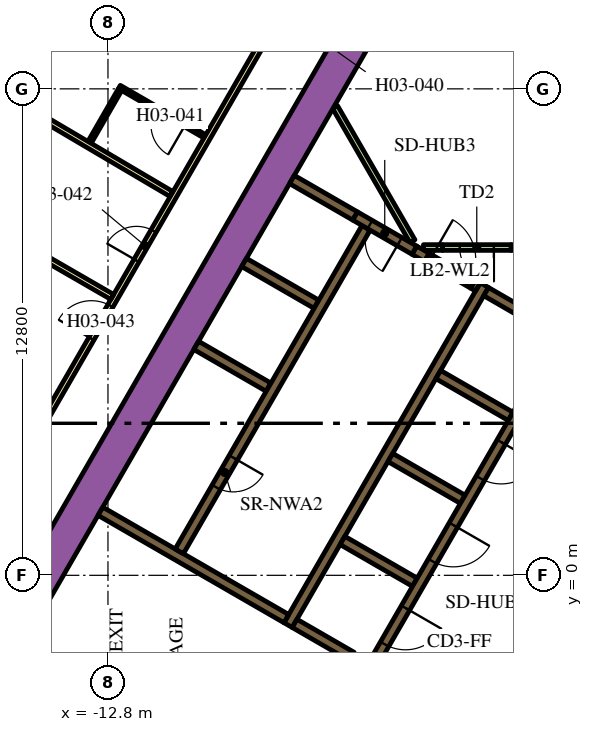
"""IFC4 building model, lengths in metres.
Left out: names, types, materials, properties, quantities, classifications, styles, units other than length and angle.
Written with IfcOpenShell. Run it as: python <this file> out.ifc"""

import sys

from ifc_helpers import new_model, si_unit, direction, frame, frame_2d, origin, place, context, subcontext, project, spatial, polyline, rectangle, outline, extrude, element, fill, save


model = new_model("IFC4")
c1 = context("Model", 3, precision=1e-05, world=origin(), true_north=direction((0.0, 1.0)))
c2 = subcontext(c1, "Body", "Model", "MODEL_VIEW")
j1 = project(units=[si_unit("LENGTHUNIT", "METRE"), si_unit("PLANEANGLEUNIT", "RADIAN")], contexts=[c1])
p1 = place(None, origin())
s1 = spatial("IfcSite", under=j1, at=p1, CompositionType="ELEMENT")
p2 = place(p1, origin())
s2 = spatial("IfcBuilding", under=s1, at=p2, CompositionType="ELEMENT")
p3 = place(p2, frame((0.0, 0.0, 51.0)))
s3 = spatial("IfcBuildingStorey", under=s2, at=p3, CompositionType="ELEMENT", Elevation=51.0)
p4 = place(p3, frame((-15.36, -1.503, 0.0), z_axis=(0.0, 0.0, 1.0), x_axis=(0.50000389221, 0.866023156604, 0.0)))
e1 = element("IfcWall", 1, at=p4, inside=s3, PredefinedType="SOLIDWALL", context=c2, shape_type="SweptSolid", body=[
    extrude(rectangle(XDim=21.0, YDim=0.9, at=frame_2d((10.5, 0.0))), origin(), (0.0, 0.0, 1.0), 3.9),
])
p5 = place(p3, frame((-8.06, -1.311, 0.0), z_axis=(0.0, 0.0, 1.0), x_axis=(0.50000273126, 0.866023826885, 0.0)))
e2 = element("IfcWall", 2, at=p5, inside=s3, PredefinedType="SOLIDWALL", context=c2, shape_type="SweptSolid", body=[
    extrude(rectangle(XDim=10.33, YDim=0.25, at=frame_2d((5.165, 0.0))), origin(), (0.0, 0.0, 1.0), 3.9),
])
p6 = place(p3, frame((-1.647, 6.771, 0.0), z_axis=(0.0, 0.0, 1.0), x_axis=(-0.865971728693, 0.500092956464, 0.0)))
e3 = element("IfcWall", 3, at=p6, inside=s3, PredefinedType="SOLIDWALL", context=c2, shape_type="SweptSolid", body=[
    extrude(rectangle(XDim=1.388, YDim=0.25, at=frame_2d((0.694, 0.0))), origin(), (0.0, 0.0, 1.0), 3.9),
])
for number, where, z_axis, x_axis in (
    (4, (-2.204, 4.182, 0.0), (0.0, 0.0, 1.0), (-0.866, 0.5, 0.0)),
    (5, (-5.369, 3.1, 0.0), (0.0, 0.0, 1.0), (0.866, -0.5, 0.0)),
    (6, (-4.724, -0.182, 0.0), (0.0, 0.0, 1.0), (-0.866, 0.5, 0.0)),
):
    element("IfcWall", number, at=place(p3, frame(where, z_axis=z_axis, x_axis=x_axis)), inside=s3, PredefinedType="SOLIDWALL", context=c2, shape_type="SweptSolid", body=[
        extrude(rectangle(XDim=2.2, YDim=0.25, at=frame_2d((1.1, 0.0))), origin(), (0.0, 0.0, 1.0), 3.9),
    ])
p7 = place(p3, frame((-7.889, -1.265, 0.0), z_axis=(0.0, 0.0, 1.0), x_axis=(0.865986741702, -0.500066958712, 0.0)))
e7 = element("IfcWall", 7, at=p7, inside=s3, PredefinedType="SOLIDWALL", context=c2, shape_type="SweptSolid", body=[
    extrude(rectangle(XDim=1.738, YDim=0.25, at=frame_2d((0.869, 0.0))), origin(), (0.0, 0.0, 1.0), 3.9),
])
p8 = place(p3, frame((-8.106, -1.14, 0.0), z_axis=(0.0, 0.0, 1.0), x_axis=(-0.866000643155, 0.500042884217, 0.0)))
e8 = element("IfcWall", 8, at=p8, inside=s3, PredefinedType="SOLIDWALL", context=c2, shape_type="SweptSolid", body=[
    extrude(rectangle(XDim=5.65, YDim=0.25, at=frame_2d((2.825, 0.0))), origin(), (0.0, 0.0, 1.0), 3.9),
])
p9 = place(p3, origin())
e9 = element("IfcWall", 9, at=p9, inside=s3, PredefinedType="SOLIDWALL", context=c2, shape_type="SweptSolid", body=[
    extrude(outline(polyline([(-3.128, 7.481), (-3.259, 7.557), (-3.134, 7.773), (-3.003, 7.698), (-3.128, 7.481)])), origin(), (0.0, 0.0, 1.0), 3.9),
])
for number, where, z_axis, x_axis in (
    (10, (-8.574, 4.95, 0.0), (0.0, 0.0, 1.0), (-0.866, 0.5, 0.0)),
    (11, (-7.314, 7.132, 0.0), (0.0, 0.0, 1.0), (-0.866, 0.5, 0.0)),
):
    element("IfcWall", number, at=place(p3, frame(where, z_axis=z_axis, x_axis=x_axis)), inside=s3, PredefinedType="SOLIDWALL", context=c2, shape_type="SweptSolid", body=[
        extrude(rectangle(XDim=2.2, YDim=0.25, at=frame_2d((1.1, 0.0))), origin(), (0.0, 0.0, 1.0), 3.9),
    ])
p10 = place(p3, frame((-6.296, 9.455, 0.0), z_axis=(0.0, 0.0, 1.0), x_axis=(-0.866011930837, 0.500023335103, 0.0)))
e12 = element("IfcWall", 12, at=p10, inside=s3, PredefinedType="SOLIDWALL", context=c2, shape_type="SweptSolid", body=[
    extrude(rectangle(XDim=1.92, YDim=0.25, at=frame_2d((0.96, 0.0))), origin(), (0.0, 0.0, 1.0), 3.9),
])
p11 = place(p3, frame((-4.409, 8.365, 0.0), z_axis=(0.0, 0.0, 1.0), x_axis=(-0.866057014183, 0.499945245186, 0.0)))
e13 = element("IfcWall", 13, at=p11, inside=s3, PredefinedType="SOLIDWALL", context=c2, shape_type="SweptSolid", body=[
    extrude(rectangle(XDim=0.379, YDim=0.25, at=frame_2d((0.19, 0.0))), origin(), (0.0, 0.0, 1.0), 3.9),
])
p12 = place(p3, frame((-2.195, 8.625, 0.0), z_axis=(0.0, 0.0, 1.0), x_axis=(1.0, 0.0, 0.0)))
e14 = element("IfcWall", 14, at=p12, inside=s3, PredefinedType="PARTITIONING", context=c2, shape_type="SweptSolid", body=[
    extrude(rectangle(XDim=1.145, YDim=0.15, at=frame_2d((0.573, 0.0))), origin(), (0.0, 0.0, 1.0), 2.75),
])
p13 = place(p3, frame((-6.823, 12.318, 0.0), z_axis=(0.0, 0.0, 1.0), x_axis=(0.500007885066, -0.866020851292, 0.0)))
e15 = element("IfcWall", 15, at=p13, inside=s3, PredefinedType="PARTITIONING", context=c2, shape_type="SweptSolid", body=[
    extrude(rectangle(XDim=4.072, YDim=0.15, at=frame_2d((2.036, 0.0))), origin(), (0.0, 0.0, 1.0), 2.75),
])
p14 = place(p3, frame((-4.498, 8.625, 0.0), z_axis=(0.0, 0.0, 1.0), x_axis=(1.0, 0.0, 0.0)))
e16 = element("IfcWall", 16, at=p14, inside=s3, PredefinedType="PARTITIONING", context=c2, shape_type="SweptSolid", body=[
    extrude(rectangle(XDim=0.502, YDim=0.15, at=frame_2d((0.251, 0.0))), origin(), (0.0, 0.0, 1.0), 2.75),
])
p15 = place(p3, frame((-6.008, 9.144, 0.0), z_axis=(0.0, 0.0, 1.0), x_axis=(-0.500006956611, -0.866021387346, 0.0)))
e17 = element("IfcWall", 17, at=p15, inside=s3, PredefinedType="SOLIDWALL", context=c2, shape_type="SweptSolid", body=[
    extrude(rectangle(XDim=9.83, YDim=0.25, at=frame_2d((4.915, 0.0))), origin(), (0.0, 0.0, 1.0), 3.9),
])
p16 = place(p15, frame((6.985, 0.0, 0.0)))
e18 = element("IfcOpeningElement", 18, at=p16, cuts=e17, PredefinedType="OPENING", context=c2, shape_type="SweptSolid", body=[
    extrude(rectangle(XDim=0.9, YDim=2.1, at=frame_2d((0.45, 1.05))), frame((0.0, 0.135, 0.0), z_axis=(0.0, -1.0, 0.0), x_axis=(1.0, 0.0, 0.0)), (0.0, 0.0, 1.0), 0.27),
])
p17 = place(p3, frame((-0.898, 6.194, 0.0), z_axis=(0.0, 0.0, 1.0), x_axis=(-0.499996202215, -0.866027596426, 0.0)))
e19 = element("IfcWall", 19, at=p17, inside=s3, PredefinedType="SOLIDWALL", context=c2, shape_type="SweptSolid", body=[
    extrude(rectangle(XDim=9.83, YDim=0.25, at=frame_2d((4.915, 0.0))), origin(), (0.0, 0.0, 1.0), 3.9),
])
p18 = place(p17, frame((0.585, 0.0, 0.0)))
e20 = element("IfcOpeningElement", 20, at=p18, cuts=e19, PredefinedType="OPENING", context=c2, shape_type="SweptSolid", body=[
    extrude(rectangle(XDim=1.1, YDim=2.1, at=frame_2d((0.55, 1.05))), frame((0.0, 0.135, 0.0), z_axis=(0.0, -1.0, 0.0), x_axis=(1.0, 0.0, 0.0)), (0.0, 0.0, 1.0), 0.27),
])
p19 = place(p17, frame((3.105, 0.0, 0.0)))
e21 = element("IfcOpeningElement", 21, at=p19, cuts=e19, PredefinedType="OPENING", context=c2, shape_type="SweptSolid", body=[
    extrude(rectangle(XDim=1.1, YDim=2.1, at=frame_2d((0.55, 1.05))), frame((0.0, 0.135, 0.0), z_axis=(0.0, -1.0, 0.0), x_axis=(1.0, 0.0, 0.0)), (0.0, 0.0, 1.0), 0.27),
])
p20 = place(p17, frame((5.625, 0.0, 0.0)))
e22 = element("IfcOpeningElement", 22, at=p20, cuts=e19, PredefinedType="OPENING", context=c2, shape_type="SweptSolid", body=[
    extrude(rectangle(XDim=1.1, YDim=2.1, at=frame_2d((0.55, 1.05))), frame((0.0, 0.135, 0.0), z_axis=(0.0, -1.0, 0.0), x_axis=(1.0, 0.0, 0.0)), (0.0, 0.0, 1.0), 0.27),
])
p21 = place(p17, frame((8.145, 0.0, 0.0)))
e23 = element("IfcOpeningElement", 23, at=p21, cuts=e19, PredefinedType="OPENING", context=c2, shape_type="SweptSolid", body=[
    extrude(rectangle(XDim=1.1, YDim=2.1, at=frame_2d((0.55, 1.05))), frame((0.0, 0.135, 0.0), z_axis=(0.0, -1.0, 0.0), x_axis=(1.0, 0.0, 0.0)), (0.0, 0.0, 1.0), 0.27),
])
p22 = place(p3, frame((-2.195, 8.625, 0.0), z_axis=(0.0, 0.0, 1.0), x_axis=(-1.0, 0.0, 0.0)))
e24 = element("IfcWall", 24, at=p22, inside=s3, PredefinedType="PARTITIONING", context=c2, shape_type="SweptSolid", body=[
    extrude(rectangle(XDim=1.8, YDim=0.15, at=frame_2d((0.9, 0.0))), origin(), (0.0, 0.0, 1.0), 2.75),
])
p23 = place(p22, frame((0.45, 0.0, 0.0)))
e25 = element("IfcOpeningElement", 25, at=p23, cuts=e24, PredefinedType="OPENING", context=c2, shape_type="SweptSolid", body=[
    extrude(rectangle(XDim=0.9, YDim=2.1, at=frame_2d((0.45, 1.05))), frame((0.0, 0.085, 0.0), z_axis=(0.0, -1.0, 0.0), x_axis=(1.0, 0.0, 0.0)), (0.0, 0.0, 1.0), 0.17),
])
p24 = place(p3, frame((-4.409, 8.365, 0.0), z_axis=(0.0, 0.0, 1.0), x_axis=(0.866034573852, -0.49998411664, 0.0)))
e26 = element("IfcWall", 26, at=p24, inside=s3, PredefinedType="SOLIDWALL", context=c2, shape_type="SweptSolid", body=[
    extrude(rectangle(XDim=1.4, YDim=0.25, at=frame_2d((0.7, 0.0))), origin(), (0.0, 0.0, 1.0), 3.9),
])
p25 = place(p24, frame((0.1, 0.0, 0.0)))
e27 = element("IfcOpeningElement", 27, at=p25, cuts=e26, PredefinedType="OPENING", context=c2, shape_type="SweptSolid", body=[
    extrude(rectangle(XDim=1.2, YDim=2.1, at=frame_2d((0.6, 1.05))), frame((0.0, 0.135, 0.0), z_axis=(0.0, -1.0, 0.0), x_axis=(1.0, 0.0, 0.0)), (0.0, 0.0, 1.0), 0.27),
])
p26 = place(p3, frame((-4.737, 8.555, 0.0), z_axis=(0.0, 0.0, 1.0), x_axis=(-0.865989075817, 0.500062916607, 0.0)))
e28 = element("IfcWall", 28, at=p26, inside=s3, PredefinedType="SOLIDWALL", context=c2, shape_type="SweptSolid", body=[
    extrude(rectangle(XDim=1.8, YDim=0.25, at=frame_2d((0.9, 0.0))), origin(), (0.0, 0.0, 1.0), 3.9),
])
p27 = place(p26, frame((0.45, 0.0, 0.0)))
e29 = element("IfcOpeningElement", 29, at=p27, cuts=e28, PredefinedType="OPENING", context=c2, shape_type="SweptSolid", body=[
    extrude(rectangle(XDim=0.9, YDim=2.1, at=frame_2d((0.45, 1.05))), frame((0.0, 0.135, 0.0), z_axis=(0.0, -1.0, 0.0), x_axis=(1.0, 0.0, 0.0)), (0.0, 0.0, 1.0), 0.27),
])
p28 = place(p3, frame((-19.081, -3.9, 0.0), z_axis=(0.0, 0.0, 1.0), x_axis=(0.499998313975, 0.866026377209, 0.0)))
e30 = element("IfcWall", 30, at=p28, inside=s3, PredefinedType="PARTITIONING", context=c2, shape_type="SweptSolid", body=[
    extrude(rectangle(XDim=25.766, YDim=0.15, at=frame_2d((12.883, 0.0))), origin(), (0.0, 0.0, 1.0), 2.75),
])
p29 = place(p28, frame((22.445, 0.0, 0.0)))
e31 = element("IfcOpeningElement", 31, at=p29, cuts=e30, PredefinedType="OPENING", context=c2, shape_type="SweptSolid", body=[
    extrude(rectangle(XDim=1.0, YDim=2.1, at=frame_2d((0.5, 1.05))), frame((0.0, 0.085, 0.0), z_axis=(0.0, -1.0, 0.0), x_axis=(1.0, 0.0, 0.0)), (0.0, 0.0, 1.0), 0.17),
])
p30 = place(p28, frame((21.138, 0.0, 0.0)))
e32 = element("IfcOpeningElement", 32, at=p30, cuts=e30, PredefinedType="OPENING", context=c2, shape_type="SweptSolid", body=[
    extrude(rectangle(XDim=1.0, YDim=2.1, at=frame_2d((0.5, 1.05))), frame((0.0, 0.085, 0.0), z_axis=(0.0, -1.0, 0.0), x_axis=(1.0, 0.0, 0.0)), (0.0, 0.0, 1.0), 0.17),
])
p31 = place(p28, frame((14.066, 0.0, 0.0)))
e33 = element("IfcOpeningElement", 33, at=p31, cuts=e30, PredefinedType="OPENING", context=c2, shape_type="SweptSolid", body=[
    extrude(rectangle(XDim=0.9, YDim=2.1, at=frame_2d((0.45, 1.05))), frame((0.0, 0.085, 0.0), z_axis=(0.0, -1.0, 0.0), x_axis=(1.0, 0.0, 0.0)), (0.0, 0.0, 1.0), 0.17),
])
p32 = place(p28, frame((11.693, 0.0, 0.0)))
e34 = element("IfcOpeningElement", 34, at=p32, cuts=e30, PredefinedType="OPENING", context=c2, shape_type="SweptSolid", body=[
    extrude(rectangle(XDim=1.0, YDim=2.1, at=frame_2d((0.5, 1.05))), frame((0.0, 0.085, 0.0), z_axis=(0.0, -1.0, 0.0), x_axis=(1.0, 0.0, 0.0)), (0.0, 0.0, 1.0), 0.17),
])
p33 = place(p3, frame((-19.982, 11.537, 0.0), z_axis=(0.0, 0.0, 1.0), x_axis=(0.866020994654, -0.500007636761, 0.0)))
e35 = element("IfcWall", 35, at=p33, inside=s3, PredefinedType="PARTITIONING", context=c2, shape_type="SweptSolid", body=[
    extrude(rectangle(XDim=8.423, YDim=0.15, at=frame_2d((4.211, 0.0))), origin(), (0.0, 0.0, 1.0), 2.75),
])
p34 = place(p3, frame((-17.856, 13.999, 0.0), z_axis=(0.0, 0.0, 1.0), x_axis=(0.861371519381, -0.507975497047, 0.0)))
e36 = element("IfcWall", 36, at=p34, inside=s3, PredefinedType="PARTITIONING", context=c2, shape_type="SweptSolid", body=[
    extrude(rectangle(XDim=7.804, YDim=0.15, at=frame_2d((3.902, 0.0))), origin(), (0.0, 0.0, 1.0), 2.75),
])
p35 = place(p3, frame((-10.249, 11.549, 0.0), z_axis=(0.0, 0.0, 1.0), x_axis=(-0.866021400173, 0.500006934395, 0.0)))
e37 = element("IfcWall", 37, at=p35, inside=s3, PredefinedType="PARTITIONING", context=c2, shape_type="SweptSolid", body=[
    extrude(rectangle(XDim=2.6, YDim=0.1, at=frame_2d((1.3, 0.0))), origin(), (0.0, 0.0, 1.0), 2.75),
])
p36 = place(p35, frame((0.6, 0.0, 0.0)))
e38 = element("IfcOpeningElement", 38, at=p36, cuts=e37, PredefinedType="OPENING", context=c2, shape_type="SweptSolid", body=[
    extrude(rectangle(XDim=0.9, YDim=2.1, at=frame_2d((0.45, 1.05))), frame((0.0, 0.06, 0.0), z_axis=(0.0, -1.0, 0.0), x_axis=(1.0, 0.0, 0.0)), (0.0, 0.0, 1.0), 0.12),
])
p37 = place(p3, frame((-12.487, 12.772, 0.0), z_axis=(0.0, 0.0, 1.0), x_axis=(-0.500085729368, -0.865975902253, 0.0)))
e39 = element("IfcWall", 39, at=p37, inside=s3, PredefinedType="PARTITIONING", context=c2, shape_type="SweptSolid", body=[
    extrude(rectangle(XDim=1.59, YDim=0.1, at=frame_2d((0.795, 0.0))), origin(), (0.0, 0.0, 1.0), 2.75),
])
p38 = place(p16, origin())
e40 = element("IfcDoor", 40, at=p38, inside=s3, OperationType="SINGLE_SWING_LEFT", PredefinedType="DOOR", context=c2, shape_type="SweptSolid", body=[
    extrude(rectangle(XDim=0.9, YDim=2.1, at=frame_2d((0.45, 1.05))), frame((0.0, 0.025, 0.0), z_axis=(0.0, -1.0, 0.0), x_axis=(1.0, 0.0, 0.0)), (0.0, 0.0, 1.0), 0.05),
])
fill(e18, e40)
p39 = place(p19, origin())
e41 = element("IfcDoor", 41, at=p39, inside=s3, OperationType="DOUBLE_DOOR_SLIDING", PredefinedType="DOOR", context=c2, shape_type="SweptSolid", body=[
    extrude(rectangle(XDim=1.1, YDim=2.1, at=frame_2d((0.55, 1.05))), frame((0.0, 0.025, 0.0), z_axis=(0.0, -1.0, 0.0), x_axis=(1.0, 0.0, 0.0)), (0.0, 0.0, 1.0), 0.05),
])
fill(e21, e41)
p40 = place(p20, origin())
e42 = element("IfcDoor", 42, at=p40, inside=s3, OperationType="DOUBLE_DOOR_SLIDING", PredefinedType="DOOR", context=c2, shape_type="SweptSolid", body=[
    extrude(rectangle(XDim=1.1, YDim=2.1, at=frame_2d((0.55, 1.05))), frame((0.0, 0.025, 0.0), z_axis=(0.0, -1.0, 0.0), x_axis=(1.0, 0.0, 0.0)), (0.0, 0.0, 1.0), 0.05),
])
fill(e22, e42)
p41 = place(p21, origin())
e43 = element("IfcDoor", 43, at=p41, inside=s3, OperationType="DOUBLE_DOOR_SLIDING", PredefinedType="DOOR", context=c2, shape_type="SweptSolid", body=[
    extrude(rectangle(XDim=1.1, YDim=2.1, at=frame_2d((0.55, 1.05))), frame((0.0, 0.025, 0.0), z_axis=(0.0, -1.0, 0.0), x_axis=(1.0, 0.0, 0.0)), (0.0, 0.0, 1.0), 0.05),
])
fill(e23, e43)
p42 = place(p23, origin())
e44 = element("IfcDoor", 44, at=p42, inside=s3, OperationType="SINGLE_SWING_LEFT", PredefinedType="DOOR", context=c2, shape_type="SweptSolid", body=[
    extrude(rectangle(XDim=0.9, YDim=2.1, at=frame_2d((0.45, 1.05))), frame((0.0, 0.025, 0.0), z_axis=(0.0, -1.0, 0.0), x_axis=(1.0, 0.0, 0.0)), (0.0, 0.0, 1.0), 0.05),
])
fill(e25, e44)
p43 = place(p25, origin())
e45 = element("IfcDoor", 45, at=p43, inside=s3, OperationType="SINGLE_SWING_LEFT", PredefinedType="DOOR", context=c2, shape_type="SweptSolid", body=[
    extrude(rectangle(XDim=1.2, YDim=2.1, at=frame_2d((0.6, 1.05))), frame((0.0, 0.025, 0.0), z_axis=(0.0, -1.0, 0.0), x_axis=(1.0, 0.0, 0.0)), (0.0, 0.0, 1.0), 0.05),
])
fill(e27, e45)
p44 = place(p27, origin())
e46 = element("IfcDoor", 46, at=p44, inside=s3, OperationType="SINGLE_SWING_LEFT", PredefinedType="DOOR", context=c2, shape_type="SweptSolid", body=[
    extrude(rectangle(XDim=0.9, YDim=2.1, at=frame_2d((0.45, 1.05))), frame((0.0, 0.025, 0.0), z_axis=(0.0, -1.0, 0.0), x_axis=(1.0, 0.0, 0.0)), (0.0, 0.0, 1.0), 0.05),
])
fill(e29, e46)
p45 = place(p36, origin())
e47 = element("IfcDoor", 47, at=p45, inside=s3, OperationType="SINGLE_SWING_RIGHT", PredefinedType="DOOR", context=c2, shape_type="SweptSolid", body=[
    extrude(rectangle(XDim=0.9, YDim=2.1, at=frame_2d((0.45, 1.05))), frame((0.0, 0.025, 0.0), z_axis=(0.0, -1.0, 0.0), x_axis=(1.0, 0.0, 0.0)), (0.0, 0.0, 1.0), 0.05),
])
fill(e38, e47)
p46 = place(p31, origin())
e48 = element("IfcDoor", 48, at=p46, inside=s3, OperationType="SINGLE_SWING_RIGHT", PredefinedType="DOOR", context=c2, shape_type="SweptSolid", body=[
    extrude(rectangle(XDim=0.9, YDim=2.1, at=frame_2d((0.45, 1.05))), frame((0.0, 0.025, 0.0), z_axis=(0.0, -1.0, 0.0), x_axis=(1.0, 0.0, 0.0)), (0.0, 0.0, 1.0), 0.05),
])
fill(e33, e48)
p47 = place(p32, origin())
e49 = element("IfcDoor", 49, at=p47, inside=s3, OperationType="SINGLE_SWING_RIGHT", PredefinedType="DOOR", context=c2, shape_type="SweptSolid", body=[
    extrude(rectangle(XDim=1.0, YDim=2.1, at=frame_2d((0.5, 1.05))), frame((0.0, 0.025, 0.0), z_axis=(0.0, -1.0, 0.0), x_axis=(1.0, 0.0, 0.0)), (0.0, 0.0, 1.0), 0.05),
])
fill(e34, e49)
save(model, sys.argv[1])
